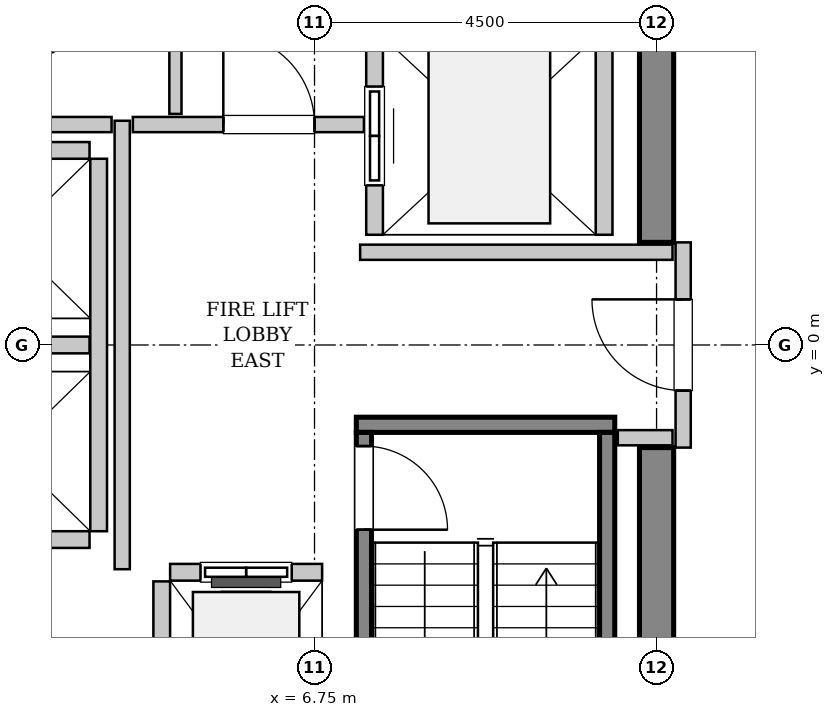
"""IFC4 building model, lengths in metres.
Left out: names, types, materials, properties, quantities, classifications, styles, units other than length and angle.
Written with IfcOpenShell. Run it as: python <this file> out.ifc"""

import sys

from ifc_helpers import new_model, si_unit, direction, frame, frame_2d, origin, place, context, subcontext, project, spatial, rectangle, extrude, source, transform, mapped, element, fill, save


model = new_model("IFC4")
c1 = context("Model", 3, precision=1e-05, world=origin(), true_north=direction((0.0, 1.0)))
c2 = subcontext(c1, "Body", "Model", "MODEL_VIEW")
j1 = project(units=[si_unit("LENGTHUNIT", "METRE"), si_unit("PLANEANGLEUNIT", "RADIAN")], contexts=[c1])
p1 = place(None, origin())
s1 = spatial("IfcSite", under=j1, at=p1, CompositionType="ELEMENT")
p2 = place(p1, origin())
s2 = spatial("IfcBuilding", under=s1, at=p2, CompositionType="ELEMENT")
p3 = place(p2, frame((0.0, 0.0, 283.6)))
s3 = spatial("IfcBuildingStorey", under=s2, at=p3, CompositionType="ELEMENT", Elevation=283.6)
m1 = source(origin(), c2, "Body", "SweptSolid", [
    extrude(rectangle(XDim=7.425, YDim=0.45, at=frame_2d((3.712, 0.0))), origin(), (0.0, 0.0, 1.0), 3.8),
])
for number, where, z_axis, x_axis in (
    (1, (11.25, -8.775, 0.0), (0.0, 0.0, 1.0), (0.0, 1.0, 0.0)),
    (2, (11.25, 1.35, 0.0), (0.0, 0.0, 1.0), (0.0, 1.0, 0.0)),
):
    element("IfcWall", number, at=place(p3, frame(where, z_axis=z_axis, x_axis=x_axis)), inside=s3, PredefinedType="SHEAR", context=c2, shape_type="MappedRepresentation", body=[
        mapped(m1, transform((0.0, 0.0, 0.0), x_axis=(1.0, 0.0, 0.0), y_axis=(0.0, 1.0, 0.0), z_axis=(0.0, 0.0, 1.0), scale=1.0)),
    ])
m2 = source(origin(), c2, "Body", "SweptSolid", [
    extrude(rectangle(XDim=3.4, YDim=0.2, at=frame_2d((1.7, 0.0))), origin(), (0.0, 0.0, 1.0), 3.8),
])
p4 = place(p3, frame((7.3, -1.05, 0.0), z_axis=(0.0, 0.0, 1.0), x_axis=(1.0, 0.0, 0.0)))
e3 = element("IfcWall", 3, at=p4, inside=s3, PredefinedType="SOLIDWALL", context=c2, shape_type="MappedRepresentation", body=[
    mapped(m2, transform((0.0, 0.0, 0.0), x_axis=(1.0, 0.0, 0.0), y_axis=(0.0, 1.0, 0.0), z_axis=(0.0, 0.0, 1.0), scale=1.0)),
])
m3 = source(origin(), c2, "Body", "SweptSolid", [
    extrude(rectangle(XDim=7.1, YDim=0.2, at=frame_2d((3.55, 0.0))), origin(), (0.0, 0.0, 1.0), 3.8),
])
p5 = place(p3, frame((7.4, -1.15, 0.0), z_axis=(0.0, 0.0, 1.0), x_axis=(0.0, -1.0, 0.0)))
e4 = element("IfcWall", 4, at=p5, inside=s3, PredefinedType="SOLIDWALL", context=c2, shape_type="MappedRepresentation", body=[
    mapped(m3, transform((0.0, 0.0, 0.0), x_axis=(1.0, 0.0, 0.0), y_axis=(0.0, 1.0, 0.0), z_axis=(0.0, 0.0, 1.0), scale=1.0)),
])
p6 = place(p5, frame((0.18, 0.0, 0.0)))
e5 = element("IfcOpeningElement", 5, at=p6, cuts=e4, PredefinedType="OPENING", context=c2, shape_type="SweptSolid", body=[
    extrude(rectangle(XDim=1.1, YDim=2.15, at=frame_2d((0.55, 1.075))), frame((0.0, 0.11, 0.0), z_axis=(0.0, -1.0, 0.0), x_axis=(1.0, 0.0, 0.0)), (0.0, 0.0, 1.0), 0.22),
])
p7 = place(p3, frame((10.6, -1.15, 0.0), z_axis=(0.0, 0.0, 1.0), x_axis=(0.0, -1.0, 0.0)))
e6 = element("IfcWall", 6, at=p7, inside=s3, PredefinedType="SOLIDWALL", context=c2, shape_type="MappedRepresentation", body=[
    mapped(m3, transform((0.0, 0.0, 0.0), x_axis=(1.0, 0.0, 0.0), y_axis=(0.0, 1.0, 0.0), z_axis=(0.0, 0.0, 1.0), scale=1.0)),
])
m4 = source(origin(), c2, "Body", "SweptSolid", [
    extrude(rectangle(XDim=2.0, YDim=0.22, at=frame_2d((1.0, 0.0))), origin(), (0.0, 0.0, 1.0), 3.535),
])
p8 = place(p3, frame((6.85, -2.99, 0.0), z_axis=(0.0, 0.0, 1.0), x_axis=(-1.0, 0.0, 0.0)))
e7 = element("IfcWall", 7, at=p8, inside=s3, PredefinedType="SOLIDWALL", context=c2, shape_type="MappedRepresentation", body=[
    mapped(m4, transform((0.0, 0.0, 0.0), x_axis=(1.0, 0.0, 0.0), y_axis=(0.0, 1.0, 0.0), z_axis=(0.0, 0.0, 1.0), scale=1.0)),
])
p9 = place(p8, frame((0.4, 0.0, 0.0)))
e8 = element("IfcOpeningElement", 8, at=p9, cuts=e7, PredefinedType="OPENING", context=c2, shape_type="SweptSolid", body=[
    extrude(rectangle(XDim=1.2, YDim=2.2, at=frame_2d((0.6, 1.1))), frame((0.0, 0.12, 0.0), z_axis=(0.0, -1.0, 0.0), x_axis=(1.0, 0.0, 0.0)), (0.0, 0.0, 1.0), 0.24),
])
m5 = source(origin(), c2, "Body", "SweptSolid", [
    extrude(rectangle(XDim=2.68, YDim=0.22, at=frame_2d((1.34, 0.0))), origin(), (0.0, 0.0, 1.0), 3.535),
])
p10 = place(p3, frame((4.74, -3.11, 0.0), z_axis=(0.0, 0.0, 1.0), x_axis=(0.0, -1.0, 0.0)))
e9 = element("IfcWall", 9, at=p10, inside=s3, PredefinedType="SOLIDWALL", context=c2, shape_type="MappedRepresentation", body=[
    mapped(m5, transform((0.0, 0.0, 0.0), x_axis=(1.0, 0.0, 0.0), y_axis=(0.0, 1.0, 0.0), z_axis=(0.0, 0.0, 1.0), scale=1.0)),
])
m6 = source(origin(), c2, "Body", "SweptSolid", [
    extrude(rectangle(XDim=5.45, YDim=0.22, at=frame_2d((2.725, 0.0))), origin(), (0.0, 0.0, 1.0), 3.535),
])
p11 = place(p3, frame((7.54, 6.9, 0.0), z_axis=(0.0, 0.0, 1.0), x_axis=(0.0, -1.0, 0.0)))
e10 = element("IfcWall", 10, at=p11, inside=s3, PredefinedType="SOLIDWALL", context=c2, shape_type="MappedRepresentation", body=[
    mapped(m6, transform((0.0, 0.0, 0.0), x_axis=(1.0, 0.0, 0.0), y_axis=(0.0, 1.0, 0.0), z_axis=(0.0, 0.0, 1.0), scale=1.0)),
])
p12 = place(p11, frame((3.5, 0.0, 0.0)))
e11 = element("IfcOpeningElement", 11, at=p12, cuts=e10, PredefinedType="OPENING", context=c2, shape_type="SweptSolid", body=[
    extrude(rectangle(XDim=1.3, YDim=2.3, at=frame_2d((0.65, 1.15))), frame((0.0, 0.12, 0.0), z_axis=(0.0, -1.0, 0.0), x_axis=(1.0, 0.0, 0.0)), (0.0, 0.0, 1.0), 0.24),
])
p13 = place(p11, frame((0.65, 0.0, 0.0)))
e12 = element("IfcOpeningElement", 12, at=p13, cuts=e10, PredefinedType="OPENING", context=c2, shape_type="SweptSolid", body=[
    extrude(rectangle(XDim=1.3, YDim=2.3, at=frame_2d((0.65, 1.15))), frame((0.0, 0.12, 0.0), z_axis=(0.0, -1.0, 0.0), x_axis=(1.0, 0.0, 0.0)), (0.0, 0.0, 1.0), 0.24),
])
p14 = place(p3, frame((10.56, 1.45, 0.0), z_axis=(0.0, 0.0, 1.0), x_axis=(0.0, 1.0, 0.0)))
e13 = element("IfcWall", 13, at=p14, inside=s3, PredefinedType="SOLIDWALL", context=c2, shape_type="MappedRepresentation", body=[
    mapped(m6, transform((0.0, 0.0, 0.0), x_axis=(1.0, 0.0, 0.0), y_axis=(0.0, 1.0, 0.0), z_axis=(0.0, 0.0, 1.0), scale=1.0)),
])
m7 = source(origin(), c2, "Body", "SweptSolid", [
    extrude(rectangle(XDim=4.9, YDim=0.22, at=frame_2d((2.45, 0.0))), origin(), (0.0, 0.0, 1.0), 3.535),
])
p15 = place(p3, frame((3.91, -2.45, 0.0), z_axis=(0.0, 0.0, 1.0), x_axis=(0.0, 1.0, 0.0)))
e14 = element("IfcWall", 14, at=p15, inside=s3, PredefinedType="SOLIDWALL", context=c2, shape_type="MappedRepresentation", body=[
    mapped(m7, transform((0.0, 0.0, 0.0), x_axis=(1.0, 0.0, 0.0), y_axis=(0.0, 1.0, 0.0), z_axis=(0.0, 0.0, 1.0), scale=1.0)),
])
m8 = source(origin(), c2, "Body", "SweptSolid", [
    extrude(rectangle(XDim=2.13, YDim=0.22, at=frame_2d((1.065, 0.0))), origin(), (0.0, 0.0, 1.0), 3.535),
])
for number, where, z_axis, x_axis in (
    (15, (1.66, -2.56, 0.0), (0.0, 0.0, 1.0), (1.0, 0.0, 0.0)),
    (16, (1.66, 0.0, 0.0), (0.0, 0.0, 1.0), (1.0, 0.0, 0.0)),
    (17, (3.79, 2.56, 0.0), (0.0, 0.0, 1.0), (-1.0, 0.0, 0.0)),
):
    element("IfcWall", number, at=place(p3, frame(where, z_axis=z_axis, x_axis=x_axis)), inside=s3, PredefinedType="SOLIDWALL", context=c2, shape_type="MappedRepresentation", body=[
        mapped(m8, transform((0.0, 0.0, 0.0), x_axis=(1.0, 0.0, 0.0), y_axis=(0.0, 1.0, 0.0), z_axis=(0.0, 0.0, 1.0), scale=1.0)),
    ])
m9 = source(origin(), c2, "Body", "SweptSolid", [
    extrude(rectangle(XDim=2.7, YDim=0.2, at=frame_2d((1.35, 0.0))), origin(), (0.0, 0.0, 1.0), 2.625),
])
p16 = place(p3, frame((11.6, -1.35, 0.0), z_axis=(0.0, 0.0, 1.0), x_axis=(0.0, 1.0, 0.0)))
e18 = element("IfcWall", 18, at=p16, inside=s3, PredefinedType="PARTITIONING", context=c2, shape_type="MappedRepresentation", body=[
    mapped(m9, transform((0.0, 0.0, 0.0), x_axis=(1.0, 0.0, 0.0), y_axis=(0.0, 1.0, 0.0), z_axis=(0.0, 0.0, 1.0), scale=1.0)),
])
p17 = place(p16, frame((0.75, 0.0, 0.0)))
e19 = element("IfcOpeningElement", 19, at=p17, cuts=e18, PredefinedType="OPENING", context=c2, shape_type="SweptSolid", body=[
    extrude(rectangle(XDim=1.2, YDim=2.15, at=frame_2d((0.6, 1.075))), frame((0.0, 0.11, 0.0), z_axis=(0.0, -1.0, 0.0), x_axis=(1.0, 0.0, 0.0)), (0.0, 0.0, 1.0), 0.22),
])
m10 = source(origin(), c2, "Body", "SweptSolid", [
    extrude(rectangle(XDim=5.9, YDim=0.2, at=frame_2d((2.95, 0.0))), origin(), (0.0, 0.0, 1.0), 3.535),
])
p18 = place(p3, frame((4.22, -2.95, 0.0), z_axis=(0.0, 0.0, 1.0), x_axis=(0.0, 1.0, 0.0)))
e20 = element("IfcWall", 20, at=p18, inside=s3, PredefinedType="PARTITIONING", context=c2, shape_type="MappedRepresentation", body=[
    mapped(m10, transform((0.0, 0.0, 0.0), x_axis=(1.0, 0.0, 0.0), y_axis=(0.0, 1.0, 0.0), z_axis=(0.0, 0.0, 1.0), scale=1.0)),
])
m11 = source(origin(), c2, "Body", "SweptSolid", [
    extrude(rectangle(XDim=2.52, YDim=0.2, at=frame_2d((1.26, 0.0))), origin(), (0.0, 0.0, 1.0), 3.535),
])
p19 = place(p3, frame((1.56, 2.9, 0.0), z_axis=(0.0, 0.0, 1.0), x_axis=(1.0, 0.0, 0.0)))
e21 = element("IfcWall", 21, at=p19, inside=s3, PredefinedType="PARTITIONING", context=c2, shape_type="MappedRepresentation", body=[
    mapped(m11, transform((0.0, 0.0, 0.0), x_axis=(1.0, 0.0, 0.0), y_axis=(0.0, 1.0, 0.0), z_axis=(0.0, 0.0, 1.0), scale=1.0)),
])
m12 = source(origin(), c2, "Body", "SweptSolid", [
    extrude(rectangle(XDim=3.04, YDim=0.2, at=frame_2d((1.52, 0.0))), origin(), (0.0, 0.0, 1.0), 3.535),
])
p20 = place(p3, frame((4.36, 2.9, 0.0), z_axis=(0.0, 0.0, 1.0), x_axis=(1.0, 0.0, 0.0)))
e22 = element("IfcWall", 22, at=p20, inside=s3, PredefinedType="PARTITIONING", context=c2, shape_type="MappedRepresentation", body=[
    mapped(m12, transform((0.0, 0.0, 0.0), x_axis=(1.0, 0.0, 0.0), y_axis=(0.0, 1.0, 0.0), z_axis=(0.0, 0.0, 1.0), scale=1.0)),
])
p21 = place(p20, frame((1.19, 0.0, 0.0)))
e23 = element("IfcOpeningElement", 23, at=p21, cuts=e22, PredefinedType="OPENING", context=c2, shape_type="SweptSolid", body=[
    extrude(rectangle(XDim=1.2, YDim=2.15, at=frame_2d((0.6, 1.075))), frame((0.0, 0.11, 0.0), z_axis=(0.0, -1.0, 0.0), x_axis=(1.0, 0.0, 0.0)), (0.0, 0.0, 1.0), 0.22),
])
m13 = source(origin(), c2, "Body", "SweptSolid", [
    extrude(rectangle(XDim=4.11, YDim=0.2, at=frame_2d((2.055, 0.0))), origin(), (0.0, 0.0, 1.0), 3.535),
])
p22 = place(p3, frame((7.35, 1.22, 0.0), z_axis=(0.0, 0.0, 1.0), x_axis=(1.0, 0.0, 0.0)))
e24 = element("IfcWall", 24, at=p22, inside=s3, PredefinedType="PARTITIONING", context=c2, shape_type="MappedRepresentation", body=[
    mapped(m13, transform((0.0, 0.0, 0.0), x_axis=(1.0, 0.0, 0.0), y_axis=(0.0, 1.0, 0.0), z_axis=(0.0, 0.0, 1.0), scale=1.0)),
])
m14 = source(origin(), c2, "Body", "SweptSolid", [
    extrude(rectangle(XDim=0.72, YDim=0.2, at=frame_2d((0.36, 0.0))), origin(), (0.0, 0.0, 1.0), 3.535),
])
p23 = place(p3, frame((10.74, -1.22, 0.0), z_axis=(0.0, 0.0, 1.0), x_axis=(1.0, 0.0, 0.0)))
e25 = element("IfcWall", 25, at=p23, inside=s3, PredefinedType="PARTITIONING", context=c2, shape_type="MappedRepresentation", body=[
    mapped(m14, transform((0.0, 0.0, 0.0), x_axis=(1.0, 0.0, 0.0), y_axis=(0.0, 1.0, 0.0), z_axis=(0.0, 0.0, 1.0), scale=1.0)),
])
m15 = source(origin(), c2, "Body", "SweptSolid", [
    extrude(rectangle(XDim=5.45, YDim=0.16, at=frame_2d((2.725, 0.0))), origin(), (0.0, 0.0, 1.0), 3.535),
])
p24 = place(p3, frame((4.92, 3.04, 0.0), z_axis=(0.0, 0.0, 1.0), x_axis=(0.0, 1.0, 0.0)))
e26 = element("IfcWall", 26, at=p24, inside=s3, PredefinedType="PARTITIONING", context=c2, shape_type="MappedRepresentation", body=[
    mapped(m15, transform((0.0, 0.0, 0.0), x_axis=(1.0, 0.0, 0.0), y_axis=(0.0, 1.0, 0.0), z_axis=(0.0, 0.0, 1.0), scale=1.0)),
])
m16 = source(origin(), c2, "Body", "SweptSolid", [
    extrude(rectangle(XDim=1.1, YDim=2.15, at=frame_2d((0.55, 1.075))), frame((0.0, 0.025, 0.0), z_axis=(0.0, -1.0, 0.0), x_axis=(1.0, 0.0, 0.0)), (0.0, 0.0, 1.0), 0.05),
])
p25 = place(p6, origin())
e27 = element("IfcDoor", 27, at=p25, inside=s3, OperationType="SINGLE_SWING_RIGHT", PredefinedType="DOOR", context=c2, shape_type="MappedRepresentation", body=[
    mapped(m16, transform((0.0, 0.0, 0.0), x_axis=(1.0, 0.0, 0.0), y_axis=(0.0, 1.0, 0.0), z_axis=(0.0, 0.0, 1.0), scale=1.0)),
])
fill(e5, e27)
m17 = source(origin(), c2, "Body", "SweptSolid", [
    extrude(rectangle(XDim=1.2, YDim=2.2, at=frame_2d((0.6, 1.1))), frame((0.0, 0.025, 0.0), z_axis=(0.0, -1.0, 0.0), x_axis=(1.0, 0.0, 0.0)), (0.0, 0.0, 1.0), 0.05),
])
p26 = place(p9, origin())
e28 = element("IfcDoor", 28, at=p26, inside=s3, OperationType="SLIDING_TO_LEFT", PredefinedType="DOOR", context=c2, shape_type="MappedRepresentation", body=[
    mapped(m17, transform((0.0, 0.0, 0.0), x_axis=(1.0, 0.0, 0.0), y_axis=(0.0, 1.0, 0.0), z_axis=(0.0, 0.0, 1.0), scale=1.0)),
])
fill(e8, e28)
m18 = source(origin(), c2, "Body", "SweptSolid", [
    extrude(rectangle(XDim=1.3, YDim=2.3, at=frame_2d((0.65, 1.15))), frame((0.0, 0.025, 0.0), z_axis=(0.0, -1.0, 0.0), x_axis=(1.0, 0.0, 0.0)), (0.0, 0.0, 1.0), 0.05),
])
p27 = place(p12, origin())
e29 = element("IfcDoor", 29, at=p27, inside=s3, OperationType="SLIDING_TO_RIGHT", PredefinedType="DOOR", context=c2, shape_type="MappedRepresentation", body=[
    mapped(m18, transform((0.0, 0.0, 0.0), x_axis=(1.0, 0.0, 0.0), y_axis=(0.0, 1.0, 0.0), z_axis=(0.0, 0.0, 1.0), scale=1.0)),
])
fill(e11, e29)
m19 = source(origin(), c2, "Body", "SweptSolid", [
    extrude(rectangle(XDim=1.2, YDim=2.15, at=frame_2d((0.6, 1.075))), frame((0.0, 0.025, 0.0), z_axis=(0.0, -1.0, 0.0), x_axis=(1.0, 0.0, 0.0)), (0.0, 0.0, 1.0), 0.05),
])
p28 = place(p17, origin())
e30 = element("IfcDoor", 30, at=p28, inside=s3, OperationType="SINGLE_SWING_RIGHT", PredefinedType="DOOR", context=c2, shape_type="MappedRepresentation", body=[
    mapped(m19, transform((0.0, 0.0, 0.0), x_axis=(1.0, 0.0, 0.0), y_axis=(0.0, 1.0, 0.0), z_axis=(0.0, 0.0, 1.0), scale=1.0)),
])
fill(e19, e30)
p29 = place(p21, origin())
e31 = element("IfcDoor", 31, at=p29, inside=s3, OperationType="SINGLE_SWING_LEFT", PredefinedType="DOOR", context=c2, shape_type="MappedRepresentation", body=[
    mapped(m19, transform((0.0, 0.0, 0.0), x_axis=(1.0, 0.0, 0.0), y_axis=(0.0, 1.0, 0.0), z_axis=(0.0, 0.0, 1.0), scale=1.0)),
])
fill(e23, e31)
save(model, sys.argv[1])
